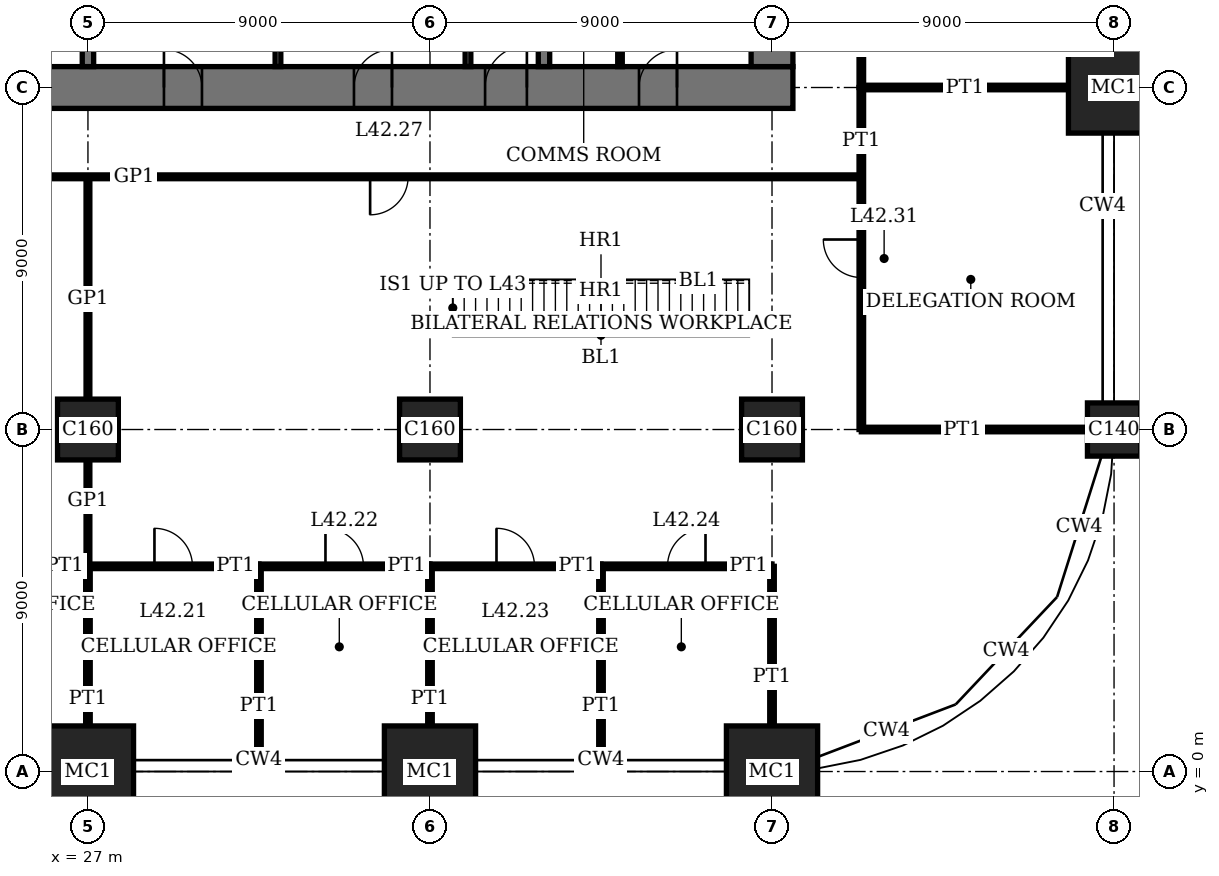
"""IFC4 building model, lengths in metres.
Left out: names, types, materials, properties, quantities, classifications, styles, units other than length and angle.
Written with IfcOpenShell. Run it as: python <this file> out.ifc"""

import sys

from ifc_helpers import new_model, si_unit, direction, frame, frame_2d, origin, origin_2d, place, context, subcontext, project, spatial, rectangle, extrude, element, fill, save


model = new_model("IFC4")
c1 = context("Model", 3, precision=1e-05, world=origin(), true_north=direction((0.0, 1.0)))
c2 = subcontext(c1, "Body", "Model", "MODEL_VIEW")
j1 = project(units=[si_unit("LENGTHUNIT", "METRE"), si_unit("PLANEANGLEUNIT", "RADIAN")], contexts=[c1])
p1 = place(None, origin())
s1 = spatial("IfcSite", under=j1, at=p1, CompositionType="ELEMENT")
p2 = place(p1, origin())
s2 = spatial("IfcBuilding", under=s1, at=p2, CompositionType="ELEMENT")
p3 = place(p2, frame((0.0, 0.0, 174.2)))
s3 = spatial("IfcBuildingStorey", under=s2, at=p3, CompositionType="ELEMENT", Elevation=174.2)
p4 = place(p3, frame((27.0, 0.0, 0.0), z_axis=(0.0, 0.0, 1.0), x_axis=(1.0, 0.0, 0.0)))
e1 = element("IfcColumn", 1, at=p4, inside=s3, PredefinedType="COLUMN", context=c2, shape_type="SweptSolid", body=[
    extrude(rectangle(XDim=2.4, YDim=2.4, at=origin_2d()), origin(), (0.0, 0.0, 1.0), 4.0),
])
p5 = place(p3, frame((27.0, 9.0, 0.0), z_axis=(0.0, 0.0, 1.0), x_axis=(1.0, 0.0, 0.0)))
e2 = element("IfcColumn", 2, at=p5, inside=s3, PredefinedType="COLUMN", context=c2, shape_type="SweptSolid", body=[
    extrude(rectangle(XDim=1.6, YDim=1.6, at=origin_2d()), origin(), (0.0, 0.0, 1.0), 4.0),
])
p6 = place(p3, frame((36.0, 0.0, 0.0), z_axis=(0.0, 0.0, 1.0), x_axis=(1.0, 0.0, 0.0)))
e3 = element("IfcColumn", 3, at=p6, inside=s3, PredefinedType="COLUMN", context=c2, shape_type="SweptSolid", body=[
    extrude(rectangle(XDim=2.4, YDim=2.4, at=origin_2d()), origin(), (0.0, 0.0, 1.0), 4.0),
])
p7 = place(p3, frame((36.0, 9.0, 0.0), z_axis=(0.0, 0.0, 1.0), x_axis=(1.0, 0.0, 0.0)))
e4 = element("IfcColumn", 4, at=p7, inside=s3, PredefinedType="COLUMN", context=c2, shape_type="SweptSolid", body=[
    extrude(rectangle(XDim=1.6, YDim=1.6, at=origin_2d()), origin(), (0.0, 0.0, 1.0), 4.0),
])
p8 = place(p3, frame((45.0, 0.0, 0.0), z_axis=(0.0, 0.0, 1.0), x_axis=(1.0, 0.0, 0.0)))
e5 = element("IfcColumn", 5, at=p8, inside=s3, PredefinedType="COLUMN", context=c2, shape_type="SweptSolid", body=[
    extrude(rectangle(XDim=2.4, YDim=2.4, at=origin_2d()), origin(), (0.0, 0.0, 1.0), 4.0),
])
p9 = place(p3, frame((45.0, 9.0, 0.0), z_axis=(0.0, 0.0, 1.0), x_axis=(1.0, 0.0, 0.0)))
e6 = element("IfcColumn", 6, at=p9, inside=s3, PredefinedType="COLUMN", context=c2, shape_type="SweptSolid", body=[
    extrude(rectangle(XDim=1.6, YDim=1.6, at=origin_2d()), origin(), (0.0, 0.0, 1.0), 4.0),
])
p10 = place(p3, frame((54.0, 9.0, 0.0), z_axis=(0.0, 0.0, 1.0), x_axis=(1.0, 0.0, 0.0)))
e7 = element("IfcColumn", 7, at=p10, inside=s3, PredefinedType="COLUMN", context=c2, shape_type="SweptSolid", body=[
    extrude(rectangle(XDim=1.4, YDim=1.4, at=origin_2d()), origin(), (0.0, 0.0, 1.0), 4.0),
])
p11 = place(p3, frame((54.0, 18.0, 0.0), z_axis=(0.0, 0.0, 1.0), x_axis=(1.0, 0.0, 0.0)))
e8 = element("IfcColumn", 8, at=p11, inside=s3, PredefinedType="COLUMN", context=c2, shape_type="SweptSolid", body=[
    extrude(rectangle(XDim=2.4, YDim=2.4, at=origin_2d()), origin(), (0.0, 0.0, 1.0), 4.0),
])
p12 = place(p3, frame((17.45, 18.0, 0.0), z_axis=(0.0, 0.0, 1.0), x_axis=(1.0, 0.0, 0.0)))
e9 = element("IfcWall", 9, at=p12, inside=s3, PredefinedType="SHEAR", context=c2, shape_type="SweptSolid", body=[
    extrude(rectangle(XDim=28.1, YDim=1.1, at=frame_2d((14.05, 0.0))), origin(), (0.0, 0.0, 1.0), 4.0),
])
p13 = place(p12, frame((11.55, 0.0, 0.0)))
e10 = element("IfcOpeningElement", 10, at=p13, cuts=e9, PredefinedType="OPENING", context=c2, shape_type="SweptSolid", body=[
    extrude(rectangle(XDim=1.0, YDim=2.4, at=frame_2d((0.5, 1.2))), frame((0.0, 0.56, 0.0), z_axis=(0.0, -1.0, 0.0), x_axis=(1.0, 0.0, 0.0)), (0.0, 0.0, 1.0), 1.12),
])
p14 = place(p12, frame((16.55, 0.0, 0.0)))
e11 = element("IfcOpeningElement", 11, at=p14, cuts=e9, PredefinedType="OPENING", context=c2, shape_type="SweptSolid", body=[
    extrude(rectangle(XDim=1.0, YDim=2.4, at=frame_2d((0.5, 1.2))), frame((0.0, 0.56, 0.0), z_axis=(0.0, -1.0, 0.0), x_axis=(1.0, 0.0, 0.0)), (0.0, 0.0, 1.0), 1.12),
])
p15 = place(p12, frame((20.0, 0.0, 0.0)))
e12 = element("IfcOpeningElement", 12, at=p15, cuts=e9, PredefinedType="OPENING", context=c2, shape_type="SweptSolid", body=[
    extrude(rectangle(XDim=1.1, YDim=2.4, at=frame_2d((0.55, 1.2))), frame((0.0, 0.56, 0.0), z_axis=(0.0, -1.0, 0.0), x_axis=(1.0, 0.0, 0.0)), (0.0, 0.0, 1.0), 1.12),
])
p16 = place(p12, frame((24.05, 0.0, 0.0)))
e13 = element("IfcOpeningElement", 13, at=p16, cuts=e9, PredefinedType="OPENING", context=c2, shape_type="SweptSolid", body=[
    extrude(rectangle(XDim=1.0, YDim=2.4, at=frame_2d((0.5, 1.2))), frame((0.0, 0.56, 0.0), z_axis=(0.0, -1.0, 0.0), x_axis=(1.0, 0.0, 0.0)), (0.0, 0.0, 1.0), 1.12),
])
p17 = place(p3, frame((45.0, 18.55, 0.0), z_axis=(0.0, 0.0, 1.0), x_axis=(0.0, 1.0, 0.0)))
e14 = element("IfcWall", 14, at=p17, inside=s3, PredefinedType="SHEAR", context=c2, shape_type="SweptSolid", body=[
    extrude(rectangle(XDim=16.9, YDim=1.1, at=frame_2d((8.45, 0.0))), origin(), (0.0, 0.0, 1.0), 4.0),
])
p18 = place(p17, frame((8.45, 0.0, 0.0)))
e15 = element("IfcOpeningElement", 15, at=p18, cuts=e14, PredefinedType="OPENING", context=c2, shape_type="SweptSolid", body=[
    extrude(rectangle(XDim=1.8, YDim=2.4, at=frame_2d((0.9, 1.2))), frame((0.0, 0.56, 0.0), z_axis=(0.0, -1.0, 0.0), x_axis=(1.0, 0.0, 0.0)), (0.0, 0.0, 1.0), 1.12),
])
p19 = place(p3, frame((27.0, 18.55, 0.0), z_axis=(0.0, 0.0, 1.0), x_axis=(0.0, 1.0, 0.0)))
e16 = element("IfcWall", 16, at=p19, inside=s3, PredefinedType="SHEAR", context=c2, shape_type="SweptSolid", body=[
    extrude(rectangle(XDim=3.05, YDim=0.3, at=frame_2d((1.525, 0.0))), origin(), (0.0, 0.0, 1.0), 4.0),
])
p20 = place(p3, frame((39.0, 18.55, 0.0), z_axis=(0.0, 0.0, 1.0), x_axis=(0.0, 1.0, 0.0)))
e17 = element("IfcWall", 17, at=p20, inside=s3, PredefinedType="SHEAR", context=c2, shape_type="SweptSolid", body=[
    extrude(rectangle(XDim=5.9, YDim=0.3, at=frame_2d((2.95, 0.0))), origin(), (0.0, 0.0, 1.0), 4.0),
])
p21 = place(p3, frame((22.5, 5.4, 0.0), z_axis=(0.0, 0.0, 1.0), x_axis=(1.0, 0.0, 0.0)))
e18 = element("IfcWall", 18, at=p21, inside=s3, PredefinedType="PARTITIONING", context=c2, shape_type="SweptSolid", body=[
    extrude(rectangle(XDim=4.5, YDim=0.12, at=frame_2d((2.25, 0.0))), origin(), (0.0, 0.0, 1.0), 3.75),
])
p22 = place(p21, frame((1.75, 0.0, 0.0)))
e19 = element("IfcOpeningElement", 19, at=p22, cuts=e18, PredefinedType="OPENING", context=c2, shape_type="SweptSolid", body=[
    extrude(rectangle(XDim=1.0, YDim=2.4, at=frame_2d((0.5, 1.2))), frame((0.0, 0.07, 0.0), z_axis=(0.0, -1.0, 0.0), x_axis=(1.0, 0.0, 0.0)), (0.0, 0.0, 1.0), 0.14),
])
p23 = place(p3, frame((27.0, 5.4, 0.0), z_axis=(0.0, 0.0, 1.0), x_axis=(1.0, 0.0, 0.0)))
e20 = element("IfcWall", 20, at=p23, inside=s3, PredefinedType="PARTITIONING", context=c2, shape_type="SweptSolid", body=[
    extrude(rectangle(XDim=4.5, YDim=0.12, at=frame_2d((2.25, 0.0))), origin(), (0.0, 0.0, 1.0), 3.75),
])
p24 = place(p23, frame((1.75, 0.0, 0.0)))
e21 = element("IfcOpeningElement", 21, at=p24, cuts=e20, PredefinedType="OPENING", context=c2, shape_type="SweptSolid", body=[
    extrude(rectangle(XDim=1.0, YDim=2.4, at=frame_2d((0.5, 1.2))), frame((0.0, 0.07, 0.0), z_axis=(0.0, -1.0, 0.0), x_axis=(1.0, 0.0, 0.0)), (0.0, 0.0, 1.0), 0.14),
])
p25 = place(p3, frame((31.5, 5.4, 0.0), z_axis=(0.0, 0.0, 1.0), x_axis=(1.0, 0.0, 0.0)))
e22 = element("IfcWall", 22, at=p25, inside=s3, PredefinedType="PARTITIONING", context=c2, shape_type="SweptSolid", body=[
    extrude(rectangle(XDim=4.5, YDim=0.12, at=frame_2d((2.25, 0.0))), origin(), (0.0, 0.0, 1.0), 3.75),
])
p26 = place(p25, frame((1.75, 0.0, 0.0)))
e23 = element("IfcOpeningElement", 23, at=p26, cuts=e22, PredefinedType="OPENING", context=c2, shape_type="SweptSolid", body=[
    extrude(rectangle(XDim=1.0, YDim=2.4, at=frame_2d((0.5, 1.2))), frame((0.0, 0.07, 0.0), z_axis=(0.0, -1.0, 0.0), x_axis=(1.0, 0.0, 0.0)), (0.0, 0.0, 1.0), 0.14),
])
p27 = place(p3, frame((36.0, 5.4, 0.0), z_axis=(0.0, 0.0, 1.0), x_axis=(1.0, 0.0, 0.0)))
e24 = element("IfcWall", 24, at=p27, inside=s3, PredefinedType="PARTITIONING", context=c2, shape_type="SweptSolid", body=[
    extrude(rectangle(XDim=4.5, YDim=0.12, at=frame_2d((2.25, 0.0))), origin(), (0.0, 0.0, 1.0), 3.75),
])
p28 = place(p27, frame((1.75, 0.0, 0.0)))
e25 = element("IfcOpeningElement", 25, at=p28, cuts=e24, PredefinedType="OPENING", context=c2, shape_type="SweptSolid", body=[
    extrude(rectangle(XDim=1.0, YDim=2.4, at=frame_2d((0.5, 1.2))), frame((0.0, 0.07, 0.0), z_axis=(0.0, -1.0, 0.0), x_axis=(1.0, 0.0, 0.0)), (0.0, 0.0, 1.0), 0.14),
])
p29 = place(p3, frame((40.5, 5.4, 0.0), z_axis=(0.0, 0.0, 1.0), x_axis=(1.0, 0.0, 0.0)))
e26 = element("IfcWall", 26, at=p29, inside=s3, PredefinedType="PARTITIONING", context=c2, shape_type="SweptSolid", body=[
    extrude(rectangle(XDim=4.5, YDim=0.12, at=frame_2d((2.25, 0.0))), origin(), (0.0, 0.0, 1.0), 3.75),
])
p30 = place(p29, frame((1.75, 0.0, 0.0)))
e27 = element("IfcOpeningElement", 27, at=p30, cuts=e26, PredefinedType="OPENING", context=c2, shape_type="SweptSolid", body=[
    extrude(rectangle(XDim=1.0, YDim=2.4, at=frame_2d((0.5, 1.2))), frame((0.0, 0.07, 0.0), z_axis=(0.0, -1.0, 0.0), x_axis=(1.0, 0.0, 0.0)), (0.0, 0.0, 1.0), 0.14),
])
p31 = place(p3, frame((47.35, 9.0, 0.0), z_axis=(0.0, 0.0, 1.0), x_axis=(1.0, 0.0, 0.0)))
e28 = element("IfcWall", 28, at=p31, inside=s3, PredefinedType="PARTITIONING", context=c2, shape_type="SweptSolid", body=[
    extrude(rectangle(XDim=5.95, YDim=0.12, at=frame_2d((2.975, 0.0))), origin(), (0.0, 0.0, 1.0), 3.05),
])
p32 = place(p3, frame((22.5, 15.65, 0.0), z_axis=(0.0, 0.0, 1.0), x_axis=(1.0, 0.0, 0.0)))
e29 = element("IfcWall", 29, at=p32, inside=s3, PredefinedType="PARTITIONING", context=c2, shape_type="SweptSolid", body=[
    extrude(rectangle(XDim=24.85, YDim=0.1, at=frame_2d((12.425, 0.0))), origin(), (0.0, 0.0, 1.0), 3.75),
])
p33 = place(p32, frame((11.925, 0.0, 0.0)))
e30 = element("IfcOpeningElement", 30, at=p33, cuts=e29, PredefinedType="OPENING", context=c2, shape_type="SweptSolid", body=[
    extrude(rectangle(XDim=1.0, YDim=2.4, at=frame_2d((0.5, 1.2))), frame((0.0, 0.06, 0.0), z_axis=(0.0, -1.0, 0.0), x_axis=(1.0, 0.0, 0.0)), (0.0, 0.0, 1.0), 0.12),
])
p34 = place(p3, frame((47.35, 18.0, 0.0), z_axis=(0.0, 0.0, 1.0), x_axis=(1.0, 0.0, 0.0)))
e31 = element("IfcWall", 31, at=p34, inside=s3, PredefinedType="PARTITIONING", context=c2, shape_type="SweptSolid", body=[
    extrude(rectangle(XDim=5.45, YDim=0.12, at=frame_2d((2.725, 0.0))), origin(), (0.0, 0.0, 1.0), 3.05),
])
p35 = place(p3, frame((27.0, 1.2, 0.0), z_axis=(0.0, 0.0, 1.0), x_axis=(0.0, 1.0, 0.0)))
e32 = element("IfcWall", 32, at=p35, inside=s3, PredefinedType="PARTITIONING", context=c2, shape_type="SweptSolid", body=[
    extrude(rectangle(XDim=4.2, YDim=0.12, at=frame_2d((2.1, 0.0))), origin(), (0.0, 0.0, 1.0), 3.05),
])
p36 = place(p3, frame((27.0, 5.4, 0.0), z_axis=(0.0, 0.0, 1.0), x_axis=(0.0, 1.0, 0.0)))
e33 = element("IfcWall", 33, at=p36, inside=s3, PredefinedType="PARTITIONING", context=c2, shape_type="SweptSolid", body=[
    extrude(rectangle(XDim=2.8, YDim=0.1, at=frame_2d((1.4, 0.0))), origin(), (0.0, 0.0, 1.0), 3.05),
])
p37 = place(p3, frame((27.0, 9.8, 0.0), z_axis=(0.0, 0.0, 1.0), x_axis=(0.0, 1.0, 0.0)))
e34 = element("IfcWall", 34, at=p37, inside=s3, PredefinedType="PARTITIONING", context=c2, shape_type="SweptSolid", body=[
    extrude(rectangle(XDim=5.85, YDim=0.1, at=frame_2d((2.925, 0.0))), origin(), (0.0, 0.0, 1.0), 3.05),
])
p38 = place(p3, frame((31.5, 0.31, 0.0), z_axis=(0.0, 0.0, 1.0), x_axis=(0.0, 1.0, 0.0)))
e35 = element("IfcWall", 35, at=p38, inside=s3, PredefinedType="PARTITIONING", context=c2, shape_type="SweptSolid", body=[
    extrude(rectangle(XDim=5.09, YDim=0.12, at=frame_2d((2.545, 0.0))), origin(), (0.0, 0.0, 1.0), 3.75),
])
p39 = place(p3, frame((36.0, 1.2, 0.0), z_axis=(0.0, 0.0, 1.0), x_axis=(0.0, 1.0, 0.0)))
e36 = element("IfcWall", 36, at=p39, inside=s3, PredefinedType="PARTITIONING", context=c2, shape_type="SweptSolid", body=[
    extrude(rectangle(XDim=4.2, YDim=0.12, at=frame_2d((2.1, 0.0))), origin(), (0.0, 0.0, 1.0), 3.05),
])
p40 = place(p3, frame((40.5, 0.31, 0.0), z_axis=(0.0, 0.0, 1.0), x_axis=(0.0, 1.0, 0.0)))
e37 = element("IfcWall", 37, at=p40, inside=s3, PredefinedType="PARTITIONING", context=c2, shape_type="SweptSolid", body=[
    extrude(rectangle(XDim=5.09, YDim=0.12, at=frame_2d((2.545, 0.0))), origin(), (0.0, 0.0, 1.0), 3.75),
])
p41 = place(p3, frame((45.0, 1.2, 0.0), z_axis=(0.0, 0.0, 1.0), x_axis=(0.0, 1.0, 0.0)))
e38 = element("IfcWall", 38, at=p41, inside=s3, PredefinedType="PARTITIONING", context=c2, shape_type="SweptSolid", body=[
    extrude(rectangle(XDim=4.2, YDim=0.12, at=frame_2d((2.1, 0.0))), origin(), (0.0, 0.0, 1.0), 3.05),
])
p42 = place(p3, frame((47.35, 9.0, 0.0), z_axis=(0.0, 0.0, 1.0), x_axis=(0.0, 1.0, 0.0)))
e39 = element("IfcWall", 39, at=p42, inside=s3, PredefinedType="PARTITIONING", context=c2, shape_type="SweptSolid", body=[
    extrude(rectangle(XDim=9.0, YDim=0.12, at=frame_2d((4.5, 0.0))), origin(), (0.0, 0.0, 1.0), 3.75),
])
p43 = place(p42, frame((4.0, 0.0, 0.0)))
e40 = element("IfcOpeningElement", 40, at=p43, cuts=e39, PredefinedType="OPENING", context=c2, shape_type="SweptSolid", body=[
    extrude(rectangle(XDim=1.0, YDim=2.4, at=frame_2d((0.5, 1.2))), frame((0.0, 0.07, 0.0), z_axis=(0.0, -1.0, 0.0), x_axis=(1.0, 0.0, 0.0)), (0.0, 0.0, 1.0), 0.14),
])
p44 = place(p3, frame((47.35, 18.0, 0.0), z_axis=(0.0, 0.0, 1.0), x_axis=(0.0, 1.0, 0.0)))
e41 = element("IfcWall", 41, at=p44, inside=s3, PredefinedType="PARTITIONING", context=c2, shape_type="SweptSolid", body=[
    extrude(rectangle(XDim=4.5, YDim=0.12, at=frame_2d((2.25, 0.0))), origin(), (0.0, 0.0, 1.0), 3.75),
])
p45 = place(p44, frame((1.75, 0.0, 0.0)))
e42 = element("IfcOpeningElement", 42, at=p45, cuts=e41, PredefinedType="OPENING", context=c2, shape_type="SweptSolid", body=[
    extrude(rectangle(XDim=1.0, YDim=2.4, at=frame_2d((0.5, 1.2))), frame((0.0, 0.07, 0.0), z_axis=(0.0, -1.0, 0.0), x_axis=(1.0, 0.0, 0.0)), (0.0, 0.0, 1.0), 0.14),
])
for number, where, z_axis, x_axis in (
    (43, (32.0, 18.55, 0.0), (0.0, 0.0, 1.0), (0.0, 1.0, 0.0)),
    (44, (37.0, 18.55, 0.0), (0.0, 0.0, 1.0), (0.0, 1.0, 0.0)),
):
    element("IfcWall", number, at=place(p3, frame(where, z_axis=z_axis, x_axis=x_axis)), inside=s3, PredefinedType="PARTITIONING", context=c2, shape_type="SweptSolid", body=[
        extrude(rectangle(XDim=2.9, YDim=0.15, at=frame_2d((1.45, 0.0))), origin(), (0.0, 0.0, 1.0), 3.75),
    ])
p46 = place(p3, frame((41.0, 18.55, 0.0), z_axis=(0.0, 0.0, 1.0), x_axis=(0.0, 1.0, 0.0)))
e45 = element("IfcWall", 45, at=p46, inside=s3, PredefinedType="PARTITIONING", context=c2, shape_type="SweptSolid", body=[
    extrude(rectangle(XDim=2.9, YDim=0.12, at=frame_2d((1.45, 0.0))), origin(), (0.0, 0.0, 1.0), 3.75),
])
p47 = place(p46, frame((0.95, 0.0, 0.0)))
e46 = element("IfcOpeningElement", 46, at=p47, cuts=e45, PredefinedType="OPENING", context=c2, shape_type="SweptSolid", body=[
    extrude(rectangle(XDim=1.0, YDim=2.4, at=frame_2d((0.5, 1.2))), frame((0.0, 0.07, 0.0), z_axis=(0.0, -1.0, 0.0), x_axis=(1.0, 0.0, 0.0)), (0.0, 0.0, 1.0), 0.14),
])
p48 = place(p13, origin())
e47 = element("IfcDoor", 47, at=p48, inside=s3, OperationType="SINGLE_SWING_RIGHT", PredefinedType="DOOR", context=c2, shape_type="SweptSolid", body=[
    extrude(rectangle(XDim=1.0, YDim=2.4, at=frame_2d((0.5, 1.2))), frame((0.0, 0.025, 0.0), z_axis=(0.0, -1.0, 0.0), x_axis=(1.0, 0.0, 0.0)), (0.0, 0.0, 1.0), 0.05),
    extrude(rectangle(XDim=0.04, YDim=2.4, at=frame_2d((0.02, 1.2))), frame((0.0, 0.4, 0.0), z_axis=(0.0, -1.0, 0.0), x_axis=(1.0, 0.0, 0.0)), (0.0, 0.0, 1.0), 0.8),
    extrude(rectangle(XDim=0.04, YDim=2.4, at=frame_2d((0.98, 1.2))), frame((0.0, 0.4, 0.0), z_axis=(0.0, -1.0, 0.0), x_axis=(1.0, 0.0, 0.0)), (0.0, 0.0, 1.0), 0.8),
    extrude(rectangle(XDim=1.0, YDim=0.04, at=frame_2d((0.5, 2.38))), frame((0.0, 0.4, 0.0), z_axis=(0.0, -1.0, 0.0), x_axis=(1.0, 0.0, 0.0)), (0.0, 0.0, 1.0), 0.8),
])
fill(e10, e47)
p49 = place(p14, origin())
e48 = element("IfcDoor", 48, at=p49, inside=s3, OperationType="SINGLE_SWING_LEFT", PredefinedType="DOOR", context=c2, shape_type="SweptSolid", body=[
    extrude(rectangle(XDim=1.0, YDim=2.4, at=frame_2d((0.5, 1.2))), frame((0.0, 0.025, 0.0), z_axis=(0.0, -1.0, 0.0), x_axis=(1.0, 0.0, 0.0)), (0.0, 0.0, 1.0), 0.05),
    extrude(rectangle(XDim=0.04, YDim=2.4, at=frame_2d((0.02, 1.2))), frame((0.0, 0.4, 0.0), z_axis=(0.0, -1.0, 0.0), x_axis=(1.0, 0.0, 0.0)), (0.0, 0.0, 1.0), 0.8),
    extrude(rectangle(XDim=0.04, YDim=2.4, at=frame_2d((0.98, 1.2))), frame((0.0, 0.4, 0.0), z_axis=(0.0, -1.0, 0.0), x_axis=(1.0, 0.0, 0.0)), (0.0, 0.0, 1.0), 0.8),
    extrude(rectangle(XDim=1.0, YDim=0.04, at=frame_2d((0.5, 2.38))), frame((0.0, 0.4, 0.0), z_axis=(0.0, -1.0, 0.0), x_axis=(1.0, 0.0, 0.0)), (0.0, 0.0, 1.0), 0.8),
])
fill(e11, e48)
p50 = place(p15, origin())
e49 = element("IfcDoor", 49, at=p50, inside=s3, OperationType="SINGLE_SWING_LEFT", PredefinedType="DOOR", context=c2, shape_type="SweptSolid", body=[
    extrude(rectangle(XDim=1.1, YDim=2.4, at=frame_2d((0.55, 1.2))), frame((0.0, 0.025, 0.0), z_axis=(0.0, -1.0, 0.0), x_axis=(1.0, 0.0, 0.0)), (0.0, 0.0, 1.0), 0.05),
    extrude(rectangle(XDim=0.04, YDim=2.4, at=frame_2d((0.02, 1.2))), frame((0.0, 0.44, 0.0), z_axis=(0.0, -1.0, 0.0), x_axis=(1.0, 0.0, 0.0)), (0.0, 0.0, 1.0), 0.88),
    extrude(rectangle(XDim=0.04, YDim=2.4, at=frame_2d((1.08, 1.2))), frame((0.0, 0.44, 0.0), z_axis=(0.0, -1.0, 0.0), x_axis=(1.0, 0.0, 0.0)), (0.0, 0.0, 1.0), 0.88),
    extrude(rectangle(XDim=1.1, YDim=0.04, at=frame_2d((0.55, 2.38))), frame((0.0, 0.44, 0.0), z_axis=(0.0, -1.0, 0.0), x_axis=(1.0, 0.0, 0.0)), (0.0, 0.0, 1.0), 0.88),
])
fill(e12, e49)
p51 = place(p16, origin())
e50 = element("IfcDoor", 50, at=p51, inside=s3, OperationType="SINGLE_SWING_LEFT", PredefinedType="DOOR", context=c2, shape_type="SweptSolid", body=[
    extrude(rectangle(XDim=1.0, YDim=2.4, at=frame_2d((0.5, 1.2))), frame((0.0, 0.025, 0.0), z_axis=(0.0, -1.0, 0.0), x_axis=(1.0, 0.0, 0.0)), (0.0, 0.0, 1.0), 0.05),
    extrude(rectangle(XDim=0.04, YDim=2.4, at=frame_2d((0.02, 1.2))), frame((0.0, 0.4, 0.0), z_axis=(0.0, -1.0, 0.0), x_axis=(1.0, 0.0, 0.0)), (0.0, 0.0, 1.0), 0.8),
    extrude(rectangle(XDim=0.04, YDim=2.4, at=frame_2d((0.98, 1.2))), frame((0.0, 0.4, 0.0), z_axis=(0.0, -1.0, 0.0), x_axis=(1.0, 0.0, 0.0)), (0.0, 0.0, 1.0), 0.8),
    extrude(rectangle(XDim=1.0, YDim=0.04, at=frame_2d((0.5, 2.38))), frame((0.0, 0.4, 0.0), z_axis=(0.0, -1.0, 0.0), x_axis=(1.0, 0.0, 0.0)), (0.0, 0.0, 1.0), 0.8),
])
fill(e13, e50)
p52 = place(p24, origin())
e51 = element("IfcDoor", 51, at=p52, inside=s3, OperationType="SINGLE_SWING_RIGHT", PredefinedType="DOOR", context=c2, shape_type="SweptSolid", body=[
    extrude(rectangle(XDim=1.0, YDim=2.4, at=frame_2d((0.5, 1.2))), frame((0.0, 0.025, 0.0), z_axis=(0.0, -1.0, 0.0), x_axis=(1.0, 0.0, 0.0)), (0.0, 0.0, 1.0), 0.05),
])
fill(e21, e51)
p53 = place(p26, origin())
e52 = element("IfcDoor", 52, at=p53, inside=s3, OperationType="SINGLE_SWING_RIGHT", PredefinedType="DOOR", context=c2, shape_type="SweptSolid", body=[
    extrude(rectangle(XDim=1.0, YDim=2.4, at=frame_2d((0.5, 1.2))), frame((0.0, 0.025, 0.0), z_axis=(0.0, -1.0, 0.0), x_axis=(1.0, 0.0, 0.0)), (0.0, 0.0, 1.0), 0.05),
])
fill(e23, e52)
p54 = place(p28, origin())
e53 = element("IfcDoor", 53, at=p54, inside=s3, OperationType="SINGLE_SWING_RIGHT", PredefinedType="DOOR", context=c2, shape_type="SweptSolid", body=[
    extrude(rectangle(XDim=1.0, YDim=2.4, at=frame_2d((0.5, 1.2))), frame((0.0, 0.025, 0.0), z_axis=(0.0, -1.0, 0.0), x_axis=(1.0, 0.0, 0.0)), (0.0, 0.0, 1.0), 0.05),
])
fill(e25, e53)
p55 = place(p30, origin())
e54 = element("IfcDoor", 54, at=p55, inside=s3, OperationType="SINGLE_SWING_LEFT", PredefinedType="DOOR", context=c2, shape_type="SweptSolid", body=[
    extrude(rectangle(XDim=1.0, YDim=2.4, at=frame_2d((0.5, 1.2))), frame((0.0, 0.025, 0.0), z_axis=(0.0, -1.0, 0.0), x_axis=(1.0, 0.0, 0.0)), (0.0, 0.0, 1.0), 0.05),
])
fill(e27, e54)
p56 = place(p33, origin())
e55 = element("IfcDoor", 55, at=p56, inside=s3, OperationType="SINGLE_SWING_LEFT", PredefinedType="DOOR", context=c2, shape_type="SweptSolid", body=[
    extrude(rectangle(XDim=1.0, YDim=2.4, at=frame_2d((0.5, 1.2))), frame((0.0, 0.02, 0.0), z_axis=(0.0, -1.0, 0.0), x_axis=(1.0, 0.0, 0.0)), (0.0, 0.0, 1.0), 0.04),
])
fill(e30, e55)
p57 = place(p43, origin())
e56 = element("IfcDoor", 56, at=p57, inside=s3, OperationType="SINGLE_SWING_LEFT", PredefinedType="DOOR", context=c2, shape_type="SweptSolid", body=[
    extrude(rectangle(XDim=1.0, YDim=2.4, at=frame_2d((0.5, 1.2))), frame((0.0, 0.025, 0.0), z_axis=(0.0, -1.0, 0.0), x_axis=(1.0, 0.0, 0.0)), (0.0, 0.0, 1.0), 0.05),
])
fill(e40, e56)
save(model, sys.argv[1])
